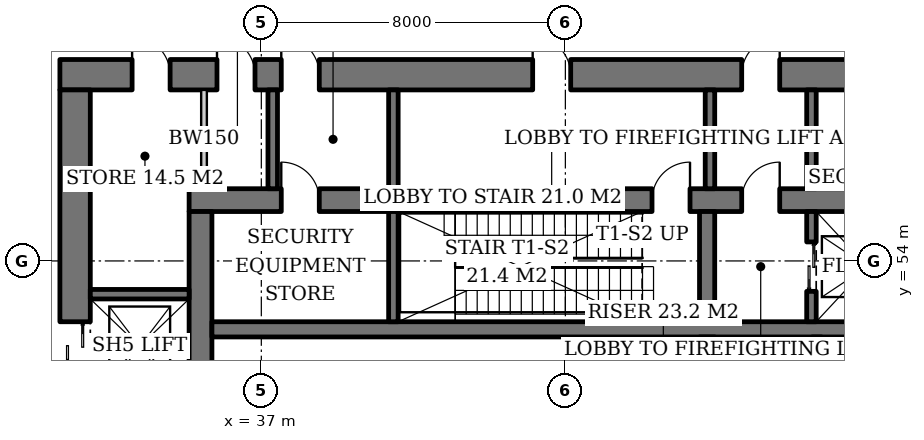
"""IFC4 building model, lengths in metres.
Left out: names, types, materials, properties, quantities, classifications, styles, units other than length and angle.
Written with IfcOpenShell. Run it as: python <this file> out.ifc"""

import sys

from ifc_helpers import new_model, si_unit, direction, frame, frame_2d, origin, place, context, subcontext, project, spatial, rectangle, extrude, element, fill, save


model = new_model("IFC4")
c1 = context("Model", 3, precision=1e-05, world=origin(), true_north=direction((0.0, 1.0)))
c2 = subcontext(c1, "Body", "Model", "MODEL_VIEW")
j1 = project(units=[si_unit("LENGTHUNIT", "METRE"), si_unit("PLANEANGLEUNIT", "RADIAN")], contexts=[c1])
p1 = place(None, origin())
s1 = spatial("IfcSite", under=j1, at=p1, CompositionType="ELEMENT")
p2 = place(p1, origin())
s2 = spatial("IfcBuilding", under=s1, at=p2, CompositionType="ELEMENT")
p3 = place(p2, origin())
s3 = spatial("IfcBuildingStorey", under=s2, at=p3, CompositionType="ELEMENT", Elevation=0.0)
p4 = place(p3, frame((35.1, 55.6, 0.0), z_axis=(0.0, 0.0, 1.0), x_axis=(1.0, 0.0, 0.0)))
e1 = element("IfcWall", 1, at=p4, inside=s3, PredefinedType="SHEAR", context=c2, shape_type="SweptSolid", body=[
    extrude(rectangle(XDim=19.8, YDim=0.6, at=frame_2d((9.9, 0.0))), origin(), (0.0, 0.0, 1.0), 6.0),
])
p5 = place(p4, frame((14.54, 0.0, 0.0)))
e2 = element("IfcOpeningElement", 2, at=p5, cuts=e1, PredefinedType="OPENING", context=c2, shape_type="SweptSolid", body=[
    extrude(rectangle(XDim=1.0, YDim=2.1, at=frame_2d((0.5, 1.05))), frame((0.0, 0.31, 0.0), z_axis=(0.0, -1.0, 0.0), x_axis=(1.0, 0.0, 0.0)), (0.0, 0.0, 1.0), 0.62),
])
p6 = place(p4, frame((12.18, 0.0, 0.0)))
e3 = element("IfcOpeningElement", 3, at=p6, cuts=e1, PredefinedType="OPENING", context=c2, shape_type="SweptSolid", body=[
    extrude(rectangle(XDim=1.0, YDim=2.1, at=frame_2d((0.5, 1.05))), frame((0.0, 0.31, 0.0), z_axis=(0.0, -1.0, 0.0), x_axis=(1.0, 0.0, 0.0)), (0.0, 0.0, 1.0), 0.62),
])
p7 = place(p4, frame((2.425, 0.0, 0.0)))
e4 = element("IfcOpeningElement", 4, at=p7, cuts=e1, PredefinedType="OPENING", context=c2, shape_type="SweptSolid", body=[
    extrude(rectangle(XDim=1.0, YDim=2.1, at=frame_2d((0.5, 1.05))), frame((0.0, 0.31, 0.0), z_axis=(0.0, -1.0, 0.0), x_axis=(1.0, 0.0, 0.0)), (0.0, 0.0, 1.0), 0.62),
])
p8 = place(p3, frame((35.4, 36.7, 0.0), z_axis=(0.0, 0.0, 1.0), x_axis=(0.0, 1.0, 0.0)))
e5 = element("IfcWall", 5, at=p8, inside=s3, PredefinedType="SHEAR", context=c2, shape_type="SweptSolid", body=[
    extrude(rectangle(XDim=18.6, YDim=0.6, at=frame_2d((9.3, 0.0))), origin(), (0.0, 0.0, 1.0), 6.0),
])
p9 = place(p8, frame((8.4, 0.0, 0.0)))
e6 = element("IfcOpeningElement", 6, at=p9, cuts=e5, PredefinedType="OPENING", context=c2, shape_type="SweptSolid", body=[
    extrude(rectangle(XDim=1.8, YDim=2.4, at=frame_2d((0.9, 1.2))), frame((0.0, 0.31, 0.0), z_axis=(0.0, -1.0, 0.0), x_axis=(1.0, 0.0, 0.0)), (0.0, 0.0, 1.0), 0.62),
])
p10 = place(p3, frame((31.7, 58.9, 0.0), z_axis=(0.0, 0.0, 1.0), x_axis=(1.0, 0.0, 0.0)))
e7 = element("IfcWall", 7, at=p10, inside=s3, PredefinedType="SHEAR", context=c2, shape_type="SweptSolid", body=[
    extrude(rectangle(XDim=26.6, YDim=0.8, at=frame_2d((13.3, 0.0))), origin(), (0.0, 0.0, 1.0), 6.0),
])
p11 = place(p10, frame((17.94, 0.0, 0.0)))
e8 = element("IfcOpeningElement", 8, at=p11, cuts=e7, PredefinedType="OPENING", context=c2, shape_type="SweptSolid", body=[
    extrude(rectangle(XDim=1.0, YDim=2.1, at=frame_2d((0.5, 1.05))), frame((0.0, 0.41, 0.0), z_axis=(0.0, -1.0, 0.0), x_axis=(1.0, 0.0, 0.0)), (0.0, 0.0, 1.0), 0.82),
])
p12 = place(p10, frame((12.44, 0.0, 0.0)))
e9 = element("IfcOpeningElement", 9, at=p12, cuts=e7, PredefinedType="OPENING", context=c2, shape_type="SweptSolid", body=[
    extrude(rectangle(XDim=1.0, YDim=2.1, at=frame_2d((0.5, 1.05))), frame((0.0, 0.41, 0.0), z_axis=(0.0, -1.0, 0.0), x_axis=(1.0, 0.0, 0.0)), (0.0, 0.0, 1.0), 0.82),
])
p13 = place(p10, frame((5.825, 0.0, 0.0)))
e10 = element("IfcOpeningElement", 10, at=p13, cuts=e7, PredefinedType="OPENING", context=c2, shape_type="SweptSolid", body=[
    extrude(rectangle(XDim=1.0, YDim=2.1, at=frame_2d((0.5, 1.05))), frame((0.0, 0.41, 0.0), z_axis=(0.0, -1.0, 0.0), x_axis=(1.0, 0.0, 0.0)), (0.0, 0.0, 1.0), 0.82),
])
p14 = place(p10, frame((1.9, 0.0, 0.0)))
e11 = element("IfcOpeningElement", 11, at=p14, cuts=e7, PredefinedType="OPENING", context=c2, shape_type="SweptSolid", body=[
    extrude(rectangle(XDim=1.0, YDim=2.1, at=frame_2d((0.5, 1.05))), frame((0.0, 0.41, 0.0), z_axis=(0.0, -1.0, 0.0), x_axis=(1.0, 0.0, 0.0)), (0.0, 0.0, 1.0), 0.82),
])
p15 = place(p10, frame((4.134, 0.0, 0.0)))
e12 = element("IfcOpeningElement", 12, at=p15, cuts=e7, PredefinedType="OPENING", context=c2, shape_type="SweptSolid", body=[
    extrude(rectangle(XDim=1.0, YDim=2.1, at=frame_2d((0.5, 1.05))), frame((0.0, 0.41, 0.0), z_axis=(0.0, -1.0, 0.0), x_axis=(1.0, 0.0, 0.0)), (0.0, 0.0, 1.0), 0.82),
])
p16 = place(p10, frame((22.35, 0.0, 0.0)))
e13 = element("IfcOpeningElement", 13, at=p16, cuts=e7, PredefinedType="OPENING", context=c2, shape_type="SweptSolid", body=[
    extrude(rectangle(XDim=1.0, YDim=2.1, at=frame_2d((0.5, 1.05))), frame((0.0, 0.41, 0.0), z_axis=(0.0, -1.0, 0.0), x_axis=(1.0, 0.0, 0.0)), (0.0, 0.0, 1.0), 0.82),
])
p17 = place(p3, frame((32.1, 33.5, 0.0), z_axis=(0.0, 0.0, 1.0), x_axis=(0.0, 1.0, 0.0)))
e14 = element("IfcWall", 14, at=p17, inside=s3, PredefinedType="SHEAR", context=c2, shape_type="SweptSolid", body=[
    extrude(rectangle(XDim=25.0, YDim=0.8, at=frame_2d((12.5, 0.0))), origin(), (0.0, 0.0, 1.0), 6.0),
])
p18 = place(p17, frame((3.35, 0.0, 0.0)))
e15 = element("IfcOpeningElement", 15, at=p18, cuts=e14, PredefinedType="OPENING", context=c2, shape_type="SweptSolid", body=[
    extrude(rectangle(XDim=1.3, YDim=2.2, at=frame_2d((0.65, 1.1))), frame((0.0, 0.41, 0.0), z_axis=(0.0, -1.0, 0.0), x_axis=(1.0, 0.0, 0.0)), (0.0, 0.0, 1.0), 0.82),
])
p19 = place(p17, frame((6.1, 0.0, 0.0)))
e16 = element("IfcOpeningElement", 16, at=p19, cuts=e14, PredefinedType="OPENING", context=c2, shape_type="SweptSolid", body=[
    extrude(rectangle(XDim=1.3, YDim=2.2, at=frame_2d((0.65, 1.1))), frame((0.0, 0.41, 0.0), z_axis=(0.0, -1.0, 0.0), x_axis=(1.0, 0.0, 0.0)), (0.0, 0.0, 1.0), 0.82),
])
p20 = place(p17, frame((8.85, 0.0, 0.0)))
e17 = element("IfcOpeningElement", 17, at=p20, cuts=e14, PredefinedType="OPENING", context=c2, shape_type="SweptSolid", body=[
    extrude(rectangle(XDim=1.3, YDim=2.2, at=frame_2d((0.65, 1.1))), frame((0.0, 0.41, 0.0), z_axis=(0.0, -1.0, 0.0), x_axis=(1.0, 0.0, 0.0)), (0.0, 0.0, 1.0), 0.82),
])
p21 = place(p17, frame((14.85, 0.0, 0.0)))
e18 = element("IfcOpeningElement", 18, at=p21, cuts=e14, PredefinedType="OPENING", context=c2, shape_type="SweptSolid", body=[
    extrude(rectangle(XDim=1.3, YDim=2.2, at=frame_2d((0.65, 1.1))), frame((0.0, 0.41, 0.0), z_axis=(0.0, -1.0, 0.0), x_axis=(1.0, 0.0, 0.0)), (0.0, 0.0, 1.0), 0.82),
])
p22 = place(p17, frame((17.6, 0.0, 0.0)))
e19 = element("IfcOpeningElement", 19, at=p22, cuts=e14, PredefinedType="OPENING", context=c2, shape_type="SweptSolid", body=[
    extrude(rectangle(XDim=1.3, YDim=2.2, at=frame_2d((0.65, 1.1))), frame((0.0, 0.41, 0.0), z_axis=(0.0, -1.0, 0.0), x_axis=(1.0, 0.0, 0.0)), (0.0, 0.0, 1.0), 0.82),
])
p23 = place(p17, frame((11.6, 0.0, 0.0)))
e20 = element("IfcOpeningElement", 20, at=p23, cuts=e14, PredefinedType="OPENING", context=c2, shape_type="SweptSolid", body=[
    extrude(rectangle(XDim=1.8, YDim=2.4, at=frame_2d((0.9, 1.2))), frame((0.0, 0.41, 0.0), z_axis=(0.0, -1.0, 0.0), x_axis=(1.0, 0.0, 0.0)), (0.0, 0.0, 1.0), 0.82),
])
p24 = place(p3, frame((35.7, 52.2, 0.0), z_axis=(0.0, 0.0, 1.0), x_axis=(1.0, 0.0, 0.0)))
e21 = element("IfcWall", 21, at=p24, inside=s3, PredefinedType="SHEAR", context=c2, shape_type="SweptSolid", body=[
    extrude(rectangle(XDim=18.6, YDim=0.4, at=frame_2d((9.3, 0.0))), origin(), (0.0, 0.0, 1.0), 6.0),
])
p25 = place(p3, frame((48.73, 40.0, 0.0), z_axis=(0.0, 0.0, 1.0), x_axis=(0.0, 1.0, 0.0)))
e22 = element("IfcWall", 22, at=p25, inside=s3, PredefinedType="SHEAR", context=c2, shape_type="SweptSolid", body=[
    extrude(rectangle(XDim=12.0, YDim=0.4, at=frame_2d((6.0, 0.0))), origin(), (0.0, 0.0, 1.0), 6.0),
])
p26 = place(p3, frame((48.73, 52.4, 0.0), z_axis=(0.0, 0.0, 1.0), x_axis=(0.0, 1.0, 0.0)))
e23 = element("IfcWall", 23, at=p26, inside=s3, PredefinedType="SHEAR", context=c2, shape_type="SweptSolid", body=[
    extrude(rectangle(XDim=2.9, YDim=0.4, at=frame_2d((1.45, 0.0))), origin(), (0.0, 0.0, 1.0), 6.0),
])
p27 = place(p3, frame((40.475, 52.4, 0.0), z_axis=(0.0, 0.0, 1.0), x_axis=(0.0, 1.0, 0.0)))
e24 = element("IfcWall", 24, at=p27, inside=s3, PredefinedType="SHEAR", context=c2, shape_type="SweptSolid", body=[
    extrude(rectangle(XDim=2.9, YDim=0.25, at=frame_2d((1.45, 0.0))), origin(), (0.0, 0.0, 1.0), 6.0),
])
p28 = place(p3, frame((51.475, 52.4, 0.0), z_axis=(0.0, 0.0, 1.0), x_axis=(0.0, 1.0, 0.0)))
e25 = element("IfcWall", 25, at=p28, inside=s3, PredefinedType="SHEAR", context=c2, shape_type="SweptSolid", body=[
    extrude(rectangle(XDim=2.9, YDim=0.25, at=frame_2d((1.45, 0.0))), origin(), (0.0, 0.0, 1.0), 6.0),
])
p29 = place(p28, frame((0.8, 0.0, 0.0)))
e26 = element("IfcOpeningElement", 26, at=p29, cuts=e25, PredefinedType="OPENING", context=c2, shape_type="SweptSolid", body=[
    extrude(rectangle(XDim=1.3, YDim=2.2, at=frame_2d((0.65, 1.1))), frame((0.0, 0.135, 0.0), z_axis=(0.0, -1.0, 0.0), x_axis=(1.0, 0.0, 0.0)), (0.0, 0.0, 1.0), 0.27),
])
p30 = place(p3, frame((51.615, 47.75, 0.0), z_axis=(0.0, 0.0, 1.0), x_axis=(0.0, 1.0, 0.0)))
e27 = element("IfcWall", 27, at=p30, inside=s3, PredefinedType="SHEAR", context=c2, shape_type="SweptSolid", body=[
    extrude(rectangle(XDim=4.25, YDim=0.25, at=frame_2d((2.125, 0.0))), origin(), (0.0, 0.0, 1.0), 6.0),
])
p31 = place(p3, frame((32.5, 53.125, 0.0), z_axis=(0.0, 0.0, 1.0), x_axis=(1.0, 0.0, 0.0)))
e28 = element("IfcWall", 28, at=p31, inside=s3, PredefinedType="SHEAR", context=c2, shape_type="SweptSolid", body=[
    extrude(rectangle(XDim=2.6, YDim=0.25, at=frame_2d((1.3, 0.0))), origin(), (0.0, 0.0, 1.0), 6.0),
])
for number, where, z_axis, x_axis in (
    (29, (48.805, 55.9, 0.0), (0.0, 0.0, 1.0), (0.0, 1.0, 0.0)),
    (30, (51.475, 55.9, 0.0), (0.0, 0.0, 1.0), (0.0, 1.0, 0.0)),
    (31, (40.475, 55.9, 0.0), (0.0, 0.0, 1.0), (0.0, 1.0, 0.0)),
    (32, (37.3, 55.9, 0.0), (0.0, 0.0, 1.0), (0.0, 1.0, 0.0)),
):
    element("IfcWall", number, at=place(p3, frame(where, z_axis=z_axis, x_axis=x_axis)), inside=s3, PredefinedType="SOLIDWALL", context=c2, shape_type="SweptSolid", body=[
        extrude(rectangle(XDim=2.6, YDim=0.25, at=frame_2d((1.3, 0.0))), origin(), (0.0, 0.0, 1.0), 5.7),
    ])
p32 = place(p3, frame((35.492, 55.9, 0.0), z_axis=(0.0, 0.0, 1.0), x_axis=(0.0, 1.0, 0.0)))
e33 = element("IfcWall", 33, at=p32, inside=s3, PredefinedType="SOLIDWALL", context=c2, shape_type="SweptSolid", body=[
    extrude(rectangle(XDim=2.6, YDim=0.15, at=frame_2d((1.3, 0.0))), origin(), (0.0, 0.0, 1.0), 5.7),
])
p33 = place(p29, origin())
e34 = element("IfcDoor", 34, at=p33, inside=s3, OperationType="DOUBLE_DOOR_SLIDING", PredefinedType="DOOR", context=c2, shape_type="SweptSolid", body=[
    extrude(rectangle(XDim=1.3, YDim=2.2, at=frame_2d((0.65, 1.1))), frame((0.0, 0.025, 0.0), z_axis=(0.0, -1.0, 0.0), x_axis=(1.0, 0.0, 0.0)), (0.0, 0.0, 1.0), 0.05),
])
fill(e26, e34)
p34 = place(p5, origin())
e35 = element("IfcDoor", 35, at=p34, inside=s3, OperationType="SINGLE_SWING_RIGHT", PredefinedType="DOOR", context=c2, shape_type="SweptSolid", body=[
    extrude(rectangle(XDim=1.0, YDim=2.1, at=frame_2d((0.5, 1.05))), frame((0.0, 0.025, 0.0), z_axis=(0.0, -1.0, 0.0), x_axis=(1.0, 0.0, 0.0)), (0.0, 0.0, 1.0), 0.05),
])
fill(e2, e35)
p35 = place(p6, origin())
e36 = element("IfcDoor", 36, at=p35, inside=s3, OperationType="SINGLE_SWING_RIGHT", PredefinedType="DOOR", context=c2, shape_type="SweptSolid", body=[
    extrude(rectangle(XDim=1.0, YDim=2.1, at=frame_2d((0.5, 1.05))), frame((0.0, 0.025, 0.0), z_axis=(0.0, -1.0, 0.0), x_axis=(1.0, 0.0, 0.0)), (0.0, 0.0, 1.0), 0.05),
])
fill(e3, e36)
p36 = place(p22, origin())
e37 = element("IfcDoor", 37, at=p36, inside=s3, OperationType="DOUBLE_DOOR_SLIDING", PredefinedType="DOOR", context=c2, shape_type="SweptSolid", body=[
    extrude(rectangle(XDim=1.3, YDim=2.2, at=frame_2d((0.65, 1.1))), frame((0.0, 0.025, 0.0), z_axis=(0.0, -1.0, 0.0), x_axis=(1.0, 0.0, 0.0)), (0.0, 0.0, 1.0), 0.05),
])
fill(e19, e37)
p37 = place(p11, origin())
e38 = element("IfcDoor", 38, at=p37, inside=s3, OperationType="SINGLE_SWING_RIGHT", PredefinedType="DOOR", context=c2, shape_type="SweptSolid", body=[
    extrude(rectangle(XDim=1.0, YDim=2.1, at=frame_2d((0.5, 1.05))), frame((0.0, 0.025, 0.0), z_axis=(0.0, -1.0, 0.0), x_axis=(1.0, 0.0, 0.0)), (0.0, 0.0, 1.0), 0.05),
])
fill(e8, e38)
p38 = place(p12, origin())
e39 = element("IfcDoor", 39, at=p38, inside=s3, OperationType="SINGLE_SWING_LEFT", PredefinedType="DOOR", context=c2, shape_type="SweptSolid", body=[
    extrude(rectangle(XDim=1.0, YDim=2.1, at=frame_2d((0.5, 1.05))), frame((0.0, 0.025, 0.0), z_axis=(0.0, -1.0, 0.0), x_axis=(1.0, 0.0, 0.0)), (0.0, 0.0, 1.0), 0.05),
])
fill(e9, e39)
p39 = place(p13, origin())
e40 = element("IfcDoor", 40, at=p39, inside=s3, OperationType="SINGLE_SWING_LEFT", PredefinedType="DOOR", context=c2, shape_type="SweptSolid", body=[
    extrude(rectangle(XDim=1.0, YDim=2.1, at=frame_2d((0.5, 1.05))), frame((0.0, 0.025, 0.0), z_axis=(0.0, -1.0, 0.0), x_axis=(1.0, 0.0, 0.0)), (0.0, 0.0, 1.0), 0.05),
])
fill(e10, e40)
p40 = place(p7, origin())
e41 = element("IfcDoor", 41, at=p40, inside=s3, OperationType="SINGLE_SWING_LEFT", PredefinedType="DOOR", context=c2, shape_type="SweptSolid", body=[
    extrude(rectangle(XDim=1.0, YDim=2.1, at=frame_2d((0.5, 1.05))), frame((0.0, -0.24, 0.0), z_axis=(0.0, -1.0, 0.0), x_axis=(1.0, 0.0, 0.0)), (0.0, 0.0, 1.0), 0.05),
])
fill(e4, e41)
p41 = place(p14, origin())
e42 = element("IfcDoor", 42, at=p41, inside=s3, OperationType="SINGLE_SWING_LEFT", PredefinedType="DOOR", context=c2, shape_type="SweptSolid", body=[
    extrude(rectangle(XDim=1.0, YDim=2.1, at=frame_2d((0.5, 1.05))), frame((0.0, -0.34, 0.0), z_axis=(0.0, -1.0, 0.0), x_axis=(1.0, 0.0, 0.0)), (0.0, 0.0, 1.0), 0.05),
])
fill(e11, e42)
p42 = place(p15, origin())
e43 = element("IfcDoor", 43, at=p42, inside=s3, OperationType="SINGLE_SWING_LEFT", PredefinedType="DOOR", context=c2, shape_type="SweptSolid", body=[
    extrude(rectangle(XDim=1.0, YDim=2.1, at=frame_2d((0.5, 1.05))), frame((0.0, -0.34, 0.0), z_axis=(0.0, -1.0, 0.0), x_axis=(1.0, 0.0, 0.0)), (0.0, 0.0, 1.0), 0.05),
])
fill(e12, e43)
save(model, sys.argv[1])
